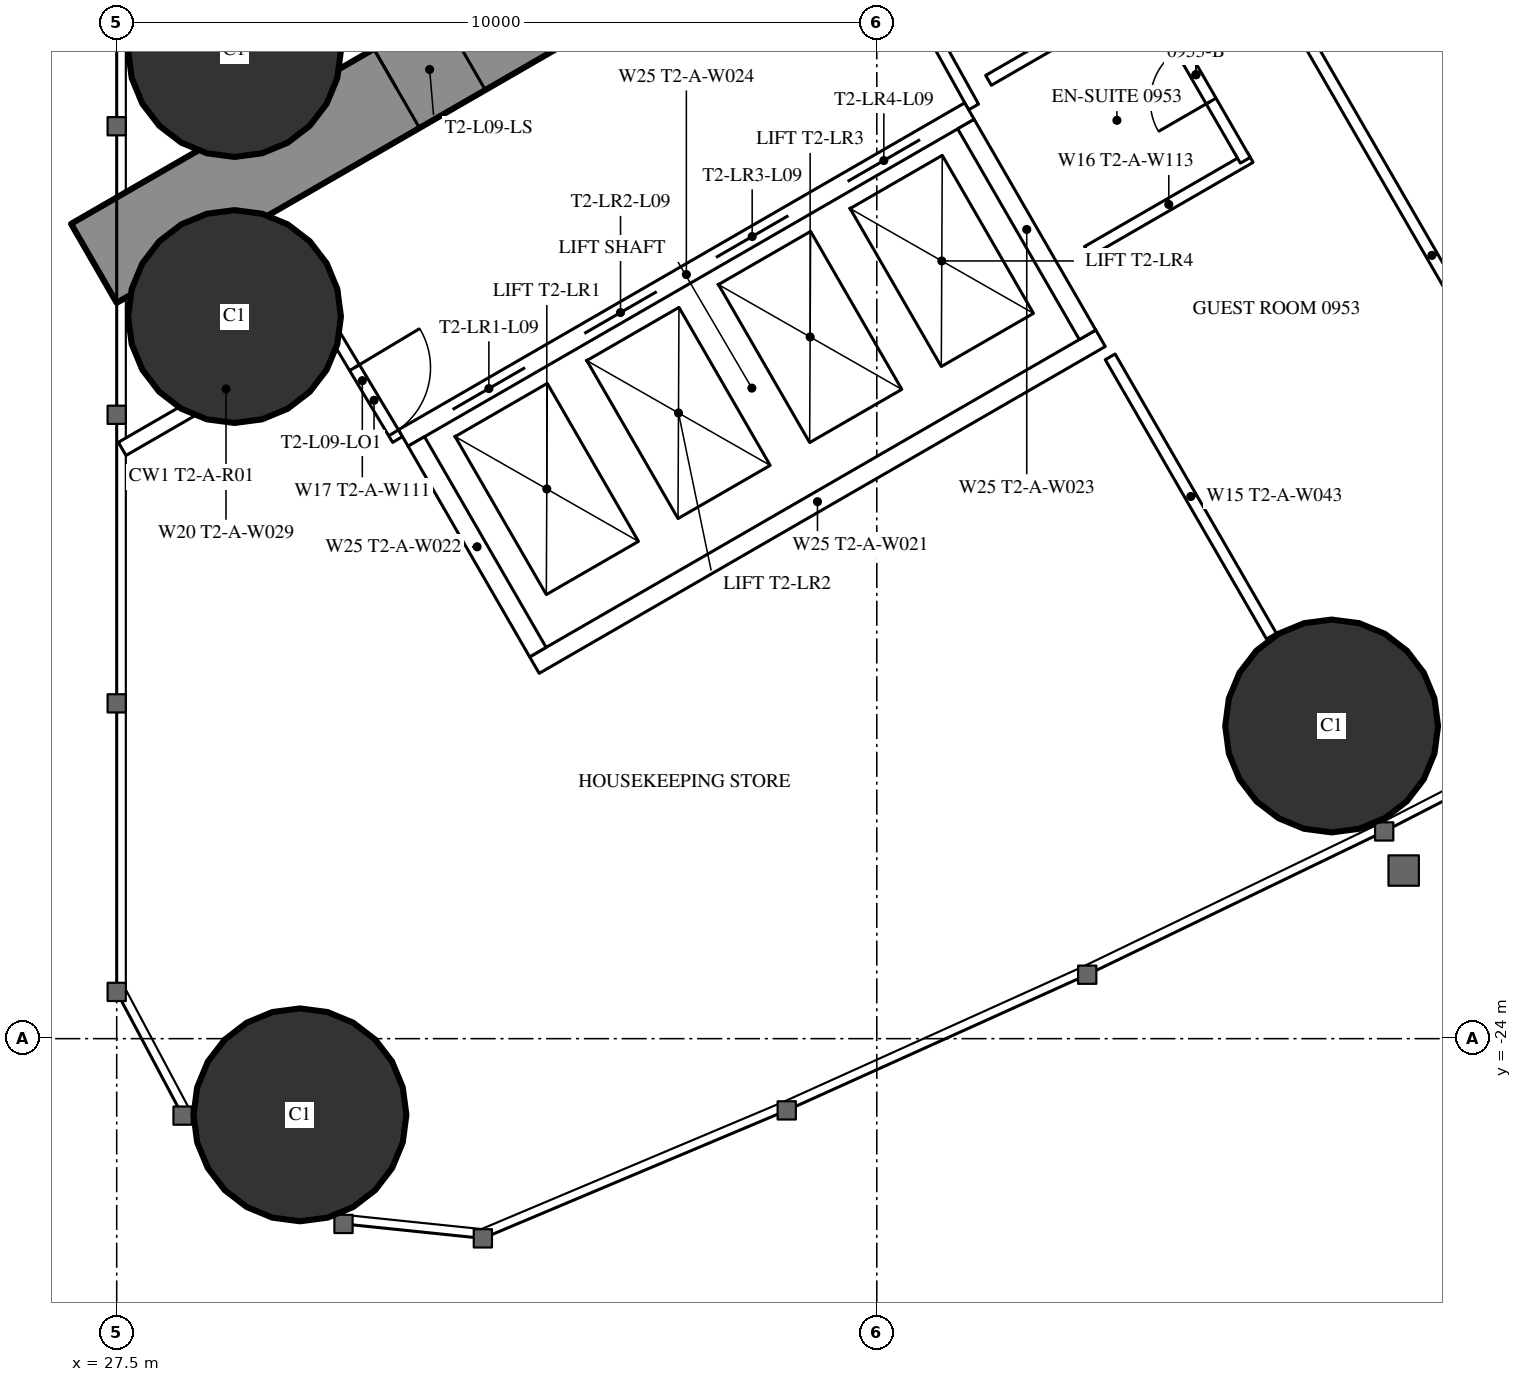
"""IFC4 building model, lengths in metres.
Left out: names, types, materials, properties, quantities, classifications, styles, units other than length and angle.
Written with IfcOpenShell. Run it as: python <this file> out.ifc"""

import sys

from ifc_helpers import new_model, si_unit, direction, frame, frame_2d, origin, origin_2d, place, context, subcontext, project, spatial, rectangle, hollow_circle, extrude, element, fill, save


model = new_model("IFC4")
c1 = context("Model", 3, precision=1e-05, world=origin(), true_north=direction((0.0, 1.0)))
c2 = subcontext(c1, "Body", "Model", "MODEL_VIEW")
j1 = project(units=[si_unit("LENGTHUNIT", "METRE"), si_unit("PLANEANGLEUNIT", "RADIAN")], contexts=[c1])
p1 = place(None, origin())
s1 = spatial("IfcSite", under=j1, at=p1, CompositionType="ELEMENT")
p2 = place(p1, origin())
s2 = spatial("IfcBuilding", under=s1, at=p2, CompositionType="ELEMENT")
p3 = place(p2, frame((0.0, 0.0, 39.0)))
s3 = spatial("IfcBuildingStorey", under=s2, at=p3, CompositionType="ELEMENT", Elevation=39.0)
for number, where, z_axis, x_axis in (
    (1, (29.911, -25.002, 0.0), (0.0, 0.0, 1.0), (1.0, 0.0, 0.0)),
    (2, (29.05, -11.0, 0.0), (0.0, 0.0, 1.0), (1.0, 0.0, 0.0)),
    (3, (29.05, -14.5, 0.0), (0.0, 0.0, 1.0), (1.0, 0.0, 0.0)),
    (4, (43.484, -19.886, 0.0), (0.0, 0.0, 1.0), (1.0, 0.0, 0.0)),
):
    element("IfcColumn", number, at=place(p3, frame(where, z_axis=z_axis, x_axis=x_axis)), inside=s3, PredefinedType="COLUMN", context=c2, shape_type="SweptSolid", body=[
        extrude(hollow_circle(Radius=1.4, WallThickness=0.12, at=origin_2d()), origin(), (0.0, 0.0, 1.0), 3.5),
    ])
p4 = place(p3, frame((27.2, -13.8, 0.0), z_axis=(0.0, 0.0, 1.0), x_axis=(0.866027159892, 0.499996958321, 0.0)))
e5 = element("IfcWall", 5, at=p4, inside=s3, PredefinedType="SHEAR", context=c2, shape_type="SweptSolid", body=[
    extrude(rectangle(XDim=27.947, YDim=1.2, at=frame_2d((13.973, 0.0))), origin(), (0.0, 0.0, 1.0), 3.5),
])
p5 = place(p4, frame((4.6, 0.0, 0.0)))
e6 = element("IfcOpeningElement", 6, at=p5, cuts=e5, PredefinedType="OPENING", context=c2, shape_type="SweptSolid", body=[
    extrude(rectangle(XDim=1.0, YDim=2.2, at=frame_2d((0.5, 1.1))), frame((0.0, 0.61, 0.0), z_axis=(0.0, -1.0, 0.0), x_axis=(1.0, 0.0, 0.0)), (0.0, 0.0, 1.0), 1.22),
])
p6 = place(p4, frame((13.395, 0.0, 0.0)))
e7 = element("IfcOpeningElement", 7, at=p6, cuts=e5, PredefinedType="OPENING", context=c2, shape_type="SweptSolid", body=[
    extrude(rectangle(XDim=1.8, YDim=2.2, at=frame_2d((0.9, 1.1))), frame((0.0, 0.61, 0.0), z_axis=(0.0, -1.0, 0.0), x_axis=(1.0, 0.0, 0.0)), (0.0, 0.0, 1.0), 1.22),
])
p7 = place(p3, frame((41.647, -8.23, 0.0), z_axis=(0.0, 0.0, 1.0), x_axis=(0.49998590462, -0.866033541603, 0.0)))
e8 = element("IfcWall", 8, at=p7, inside=s3, PredefinedType="PARTITIONING", context=c2, shape_type="SweptSolid", body=[
    extrude(rectangle(XDim=12.621, YDim=0.15, at=frame_2d((6.311, 0.0))), origin(), (0.0, 0.0, 1.0), 3.25),
])
p8 = place(p3, frame((40.57, -15.03, 0.0), z_axis=(0.0, 0.0, 1.0), x_axis=(0.500012993597, -0.866017901798, 0.0)))
e9 = element("IfcWall", 9, at=p8, inside=s3, PredefinedType="PARTITIONING", context=c2, shape_type="SweptSolid", body=[
    extrude(rectangle(XDim=4.243, YDim=0.15, at=frame_2d((2.122, 0.0))), origin(), (0.0, 0.0, 1.0), 3.25),
])
p9 = place(p3, frame((27.572, -16.241, 0.0), z_axis=(0.0, 0.0, 1.0), x_axis=(0.866029654818, 0.499992636921, 0.0)))
e10 = element("IfcWall", 10, at=p9, inside=s3, PredefinedType="PARTITIONING", context=c2, shape_type="SweptSolid", body=[
    extrude(rectangle(XDim=3.155, YDim=0.2, at=frame_2d((1.577, 0.0))), origin(), (0.0, 0.0, 1.0), 3.25),
])
p10 = place(p3, frame((38.773, -11.742, 0.0), z_axis=(0.0, 0.0, 1.0), x_axis=(-0.485528096672, 0.8742210632, 0.0)))
e11 = element("IfcWall", 11, at=p10, inside=s3, PredefinedType="PARTITIONING", context=c2, shape_type="SweptSolid", body=[
    extrude(rectangle(XDim=1.805, YDim=0.15, at=frame_2d((0.903, 0.0))), origin(), (0.0, 0.0, 1.0), 3.25),
])
p11 = place(p3, frame((30.267, -14.569, 0.0), z_axis=(0.0, 0.0, 1.0), x_axis=(0.514336634837, -0.857588377991, 0.0)))
e12 = element("IfcWall", 12, at=p11, inside=s3, PredefinedType="PARTITIONING", context=c2, shape_type="SweptSolid", body=[
    extrude(rectangle(XDim=1.805, YDim=0.15, at=frame_2d((0.903, 0.0))), origin(), (0.0, 0.0, 1.0), 3.25),
])
p12 = place(p11, frame((0.703, 0.0, 0.0)))
e13 = element("IfcOpeningElement", 13, at=p12, cuts=e12, PredefinedType="OPENING", context=c2, shape_type="SweptSolid", body=[
    extrude(rectangle(XDim=1.0, YDim=2.2, at=frame_2d((0.5, 1.1))), frame((0.0, 0.085, 0.0), z_axis=(0.0, -1.0, 0.0), x_axis=(1.0, 0.0, 0.0)), (0.0, 0.0, 1.0), 0.17),
])
p13 = place(p3, frame((40.27, -13.644, 0.0), z_axis=(0.0, 0.0, 1.0), x_axis=(0.866031185235, 0.4999899861, 0.0)))
e14 = element("IfcWall", 14, at=p13, inside=s3, PredefinedType="PARTITIONING", context=c2, shape_type="SweptSolid", body=[
    extrude(rectangle(XDim=2.475, YDim=0.15, at=frame_2d((1.238, 0.0))), origin(), (0.0, 0.0, 1.0), 3.25),
])
p14 = place(p3, frame((41.048, -10.193, 0.0), z_axis=(0.0, 0.0, 1.0), x_axis=(0.500047596559, -0.865997922154, 0.0)))
e15 = element("IfcWall", 15, at=p14, inside=s3, PredefinedType="PARTITIONING", context=c2, shape_type="SweptSolid", body=[
    extrude(rectangle(XDim=2.6, YDim=0.15, at=frame_2d((1.3, 0.0))), origin(), (0.0, 0.0, 1.0), 3.25),
])
p15 = place(p14, frame((0.9, 0.0, 0.0)))
e16 = element("IfcOpeningElement", 16, at=p15, cuts=e15, PredefinedType="OPENING", context=c2, shape_type="SweptSolid", body=[
    extrude(rectangle(XDim=0.8, YDim=2.2, at=frame_2d((0.4, 1.1))), frame((0.0, 0.085, 0.0), z_axis=(0.0, -1.0, 0.0), x_axis=(1.0, 0.0, 0.0)), (0.0, 0.0, 1.0), 0.17),
])
p16 = place(p3, frame((38.97, -11.393, 0.0), z_axis=(0.0, 0.0, 1.0), x_axis=(0.866031185235, 0.4999899861, 0.0)))
e17 = element("IfcWall", 17, at=p16, inside=s3, PredefinedType="PARTITIONING", context=c2, shape_type="SweptSolid", body=[
    extrude(rectangle(XDim=2.475, YDim=0.15, at=frame_2d((1.238, 0.0))), origin(), (0.0, 0.0, 1.0), 3.25),
])
p17 = place(p3, frame((31.271, -16.097, 0.0), z_axis=(0.0, 0.0, 1.0), x_axis=(0.86604045752, 0.499973925258, 0.0)))
e18 = element("IfcWall", 18, at=p17, inside=s3, PredefinedType="PARTITIONING", context=c2, shape_type="SweptSolid", body=[
    extrude(rectangle(XDim=8.6, YDim=0.25, at=frame_2d((4.3, 0.0))), origin(), (0.0, 0.0, 1.0), 3.25),
])
p18 = place(p17, frame((0.75, 0.0, 0.0)))
e19 = element("IfcOpeningElement", 19, at=p18, cuts=e18, PredefinedType="OPENING", context=c2, shape_type="SweptSolid", body=[
    extrude(rectangle(XDim=1.1, YDim=2.2, at=frame_2d((0.55, 1.1))), frame((0.0, 0.135, 0.0), z_axis=(0.0, -1.0, 0.0), x_axis=(1.0, 0.0, 0.0)), (0.0, 0.0, 1.0), 0.27),
])
p19 = place(p17, frame((2.75, 0.0, 0.0)))
e20 = element("IfcOpeningElement", 20, at=p19, cuts=e18, PredefinedType="OPENING", context=c2, shape_type="SweptSolid", body=[
    extrude(rectangle(XDim=1.1, YDim=2.2, at=frame_2d((0.55, 1.1))), frame((0.0, 0.135, 0.0), z_axis=(0.0, -1.0, 0.0), x_axis=(1.0, 0.0, 0.0)), (0.0, 0.0, 1.0), 0.27),
])
p20 = place(p17, frame((4.75, 0.0, 0.0)))
e21 = element("IfcOpeningElement", 21, at=p20, cuts=e18, PredefinedType="OPENING", context=c2, shape_type="SweptSolid", body=[
    extrude(rectangle(XDim=1.1, YDim=2.2, at=frame_2d((0.55, 1.1))), frame((0.0, 0.135, 0.0), z_axis=(0.0, -1.0, 0.0), x_axis=(1.0, 0.0, 0.0)), (0.0, 0.0, 1.0), 0.27),
])
p21 = place(p17, frame((6.75, 0.0, 0.0)))
e22 = element("IfcOpeningElement", 22, at=p21, cuts=e18, PredefinedType="OPENING", context=c2, shape_type="SweptSolid", body=[
    extrude(rectangle(XDim=1.1, YDim=2.2, at=frame_2d((0.55, 1.1))), frame((0.0, 0.135, 0.0), z_axis=(0.0, -1.0, 0.0), x_axis=(1.0, 0.0, 0.0)), (0.0, 0.0, 1.0), 0.27),
])
p22 = place(p3, frame((32.996, -19.086, 0.0), z_axis=(0.0, 0.0, 1.0), x_axis=(0.866028165386, 0.499995216735, 0.0)))
e23 = element("IfcWall", 23, at=p22, inside=s3, PredefinedType="PARTITIONING", context=c2, shape_type="SweptSolid", body=[
    extrude(rectangle(XDim=8.6, YDim=0.25, at=frame_2d((4.3, 0.0))), origin(), (0.0, 0.0, 1.0), 3.25),
])
for number, where, z_axis, x_axis in (
    (24, (31.441, -16.143, 0.0), (0.0, 0.0, 1.0), (0.5, -0.866, 0.0)),
    (25, (38.673, -11.968, 0.0), (0.0, 0.0, 1.0), (0.5, -0.866, 0.0)),
):
    element("IfcWall", number, at=place(p3, frame(where, z_axis=z_axis, x_axis=x_axis)), inside=s3, PredefinedType="PARTITIONING", context=c2, shape_type="SweptSolid", body=[
        extrude(rectangle(XDim=3.201, YDim=0.25, at=frame_2d((1.6, 0.0))), origin(), (0.0, 0.0, 1.0), 3.25),
    ])
p23 = place(p15, origin())
e26 = element("IfcDoor", 26, at=p23, inside=s3, OperationType="SINGLE_SWING_RIGHT", PredefinedType="DOOR", context=c2, shape_type="SweptSolid", body=[
    extrude(rectangle(XDim=0.8, YDim=2.2, at=frame_2d((0.4, 1.1))), frame((0.0, 0.025, 0.0), z_axis=(0.0, -1.0, 0.0), x_axis=(1.0, 0.0, 0.0)), (0.0, 0.0, 1.0), 0.05),
])
fill(e16, e26)
p24 = place(p12, origin())
e27 = element("IfcDoor", 27, at=p24, inside=s3, OperationType="SINGLE_SWING_LEFT", PredefinedType="DOOR", context=c2, shape_type="SweptSolid", body=[
    extrude(rectangle(XDim=1.0, YDim=2.2, at=frame_2d((0.5, 1.1))), frame((0.0, 0.025, 0.0), z_axis=(0.0, -1.0, 0.0), x_axis=(1.0, 0.0, 0.0)), (0.0, 0.0, 1.0), 0.05),
])
fill(e13, e27)
p25 = place(p5, origin())
e28 = element("IfcDoor", 28, at=p25, inside=s3, OperationType="SINGLE_SWING_LEFT", PredefinedType="DOOR", context=c2, shape_type="SweptSolid", body=[
    extrude(rectangle(XDim=1.0, YDim=2.2, at=frame_2d((0.5, 1.1))), frame((0.0, 0.025, 0.0), z_axis=(0.0, -1.0, 0.0), x_axis=(1.0, 0.0, 0.0)), (0.0, 0.0, 1.0), 0.05),
])
fill(e6, e28)
p26 = place(p18, origin())
e29 = element("IfcDoor", 29, at=p26, inside=s3, OperationType="DOUBLE_DOOR_SLIDING", PredefinedType="USERDEFINED", context=c2, shape_type="SweptSolid", body=[
    extrude(rectangle(XDim=1.1, YDim=2.2, at=frame_2d((0.55, 1.1))), frame((0.0, 0.025, 0.0), z_axis=(0.0, -1.0, 0.0), x_axis=(1.0, 0.0, 0.0)), (0.0, 0.0, 1.0), 0.05),
])
fill(e19, e29)
p27 = place(p19, origin())
e30 = element("IfcDoor", 30, at=p27, inside=s3, OperationType="DOUBLE_DOOR_SLIDING", PredefinedType="USERDEFINED", context=c2, shape_type="SweptSolid", body=[
    extrude(rectangle(XDim=1.1, YDim=2.2, at=frame_2d((0.55, 1.1))), frame((0.0, 0.025, 0.0), z_axis=(0.0, -1.0, 0.0), x_axis=(1.0, 0.0, 0.0)), (0.0, 0.0, 1.0), 0.05),
])
fill(e20, e30)
p28 = place(p20, origin())
e31 = element("IfcDoor", 31, at=p28, inside=s3, OperationType="DOUBLE_DOOR_SLIDING", PredefinedType="USERDEFINED", context=c2, shape_type="SweptSolid", body=[
    extrude(rectangle(XDim=1.1, YDim=2.2, at=frame_2d((0.55, 1.1))), frame((0.0, 0.025, 0.0), z_axis=(0.0, -1.0, 0.0), x_axis=(1.0, 0.0, 0.0)), (0.0, 0.0, 1.0), 0.05),
])
fill(e21, e31)
p29 = place(p21, origin())
e32 = element("IfcDoor", 32, at=p29, inside=s3, OperationType="DOUBLE_DOOR_SLIDING", PredefinedType="USERDEFINED", context=c2, shape_type="SweptSolid", body=[
    extrude(rectangle(XDim=1.1, YDim=2.2, at=frame_2d((0.55, 1.1))), frame((0.0, 0.025, 0.0), z_axis=(0.0, -1.0, 0.0), x_axis=(1.0, 0.0, 0.0)), (0.0, 0.0, 1.0), 0.05),
])
fill(e22, e32)
save(model, sys.argv[1])
